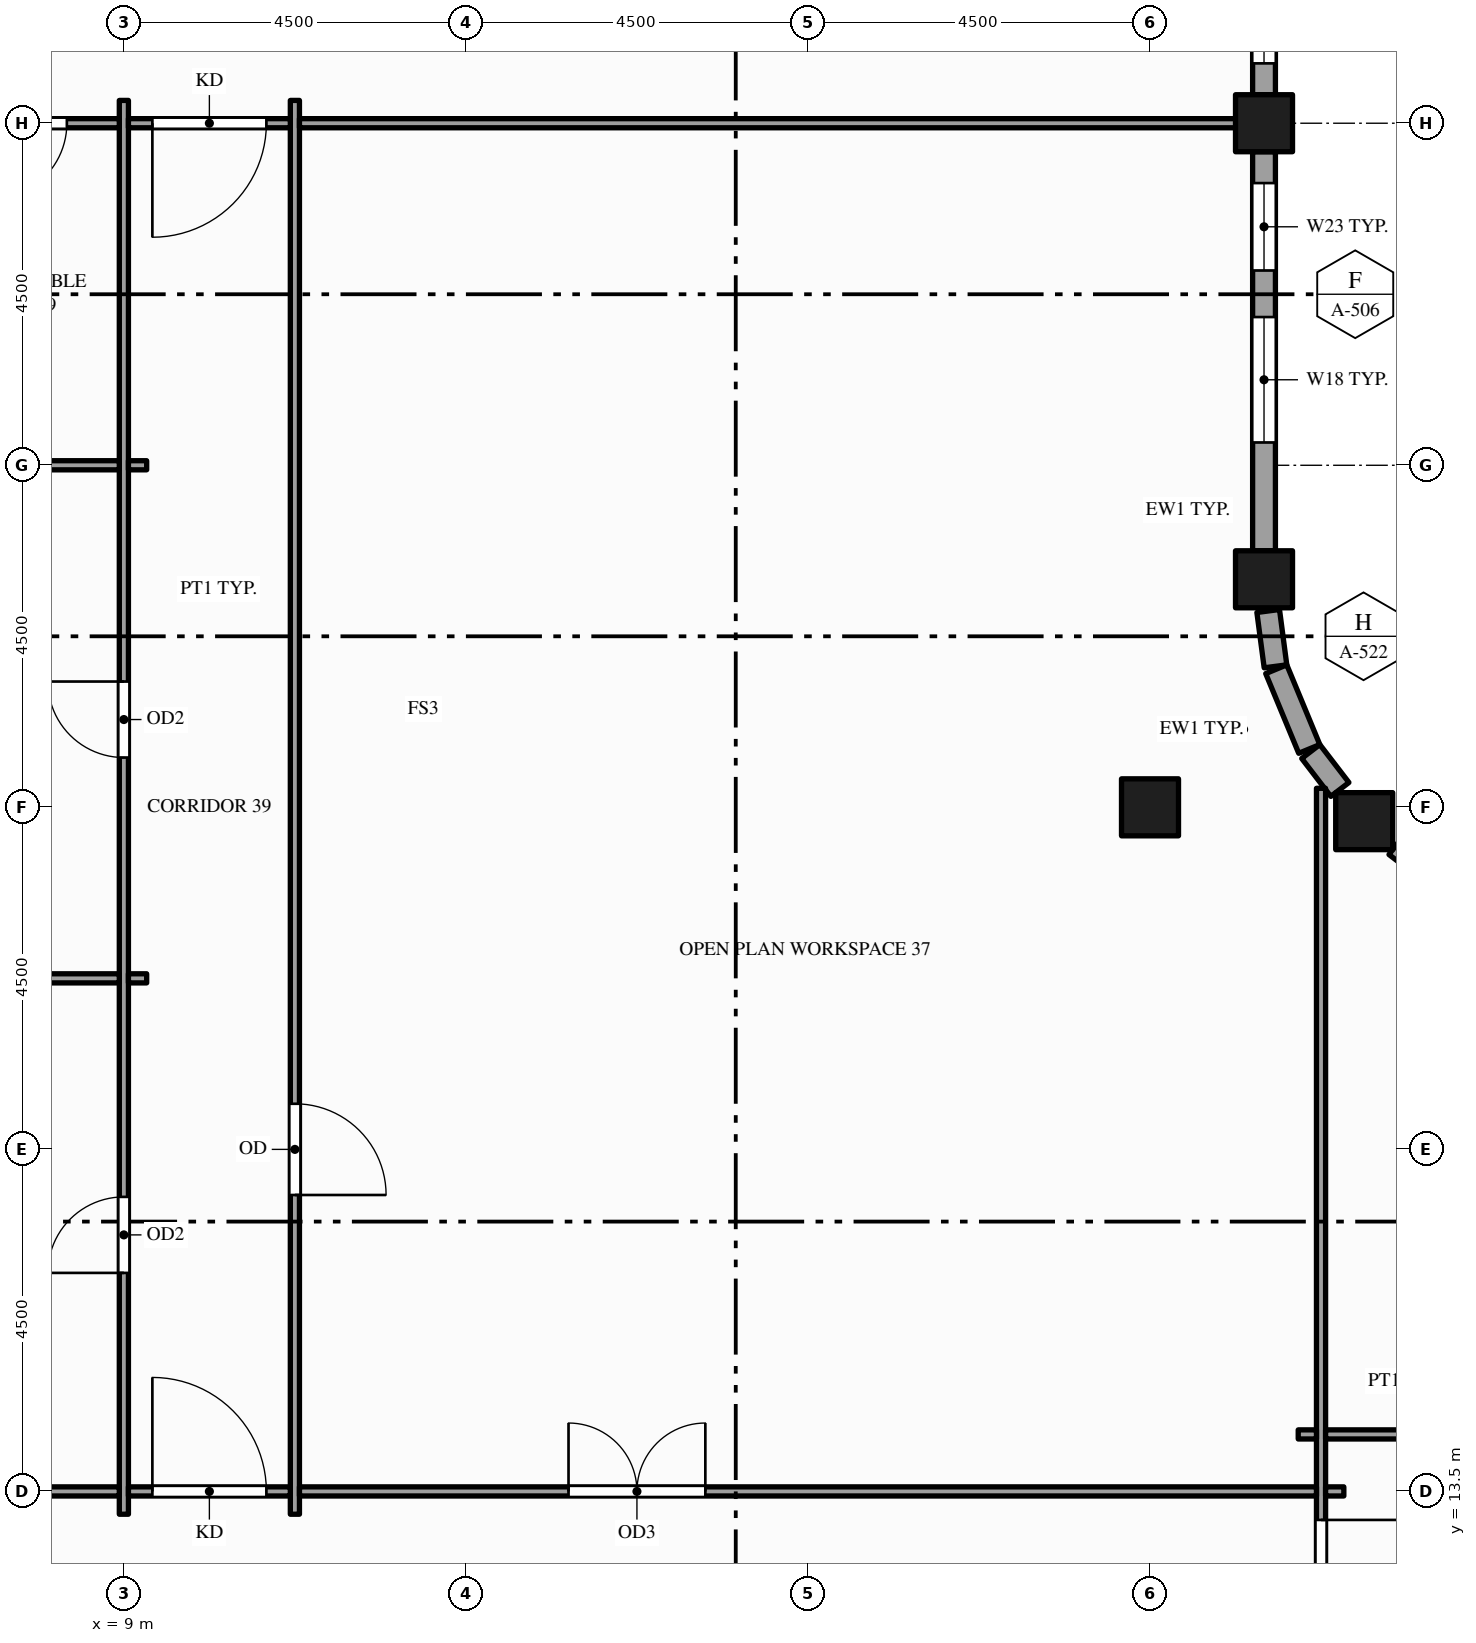
"""IFC4 building model, lengths in metres.
Left out: names, types, materials, properties, quantities, classifications, styles, units other than length and angle.
Written with IfcOpenShell. Run it as: python <this file> out.ifc"""

import sys

from ifc_helpers import new_model, si_unit, direction, frame, frame_2d, origin, origin_2d, place, context, subcontext, project, spatial, rectangle, hollow_rectangle, extrude, element, fill, save


model = new_model("IFC4")
c1 = context("Model", 3, precision=1e-05, world=origin(), true_north=direction((0.0, 1.0)))
c2 = subcontext(c1, "Body", "Model", "MODEL_VIEW")
j1 = project(units=[si_unit("LENGTHUNIT", "METRE"), si_unit("PLANEANGLEUNIT", "RADIAN")], contexts=[c1])
p1 = place(None, origin())
s1 = spatial("IfcSite", under=j1, at=p1, CompositionType="ELEMENT")
p2 = place(p1, origin())
s2 = spatial("IfcBuilding", under=s1, at=p2, CompositionType="ELEMENT")
p3 = place(p2, frame((0.0, 0.0, 239.0)))
s3 = spatial("IfcBuildingStorey", under=s2, at=p3, CompositionType="ELEMENT", Elevation=239.0)
for number, where, z_axis, x_axis in (
    (1, (22.5, 22.5, -0.15), (0.0, 0.0, 1.0), (1.0, 0.0, 0.0)),
    (2, (24.0, 25.5, -0.15), (0.0, 0.0, 1.0), (1.0, 0.0, 0.0)),
    (3, (24.0, 31.5, -0.15), (0.0, 0.0, 1.0), (1.0, 0.0, 0.0)),
    (4, (25.318, 22.318, -0.15), (0.0, 0.0, 1.0), (1.0, 0.0, 0.0)),
):
    element("IfcColumn", number, at=place(p3, frame(where, z_axis=z_axis, x_axis=x_axis)), inside=s3, PredefinedType="COLUMN", context=c2, shape_type="SweptSolid", body=[
        extrude(hollow_rectangle(XDim=0.75, YDim=0.75, WallThickness=0.036, at=origin_2d()), origin(), (0.0, 0.0, 1.0), 3.85),
    ])
for number, where, z_axis, x_axis in (
    (5, (26.234, 21.615, 0.0), (0.0, 0.0, 1.0), (-0.794, 0.608, 0.0)),
    (6, (24.998, 22.735, 0.0), (0.0, 0.0, 1.0), (-0.608, 0.794, 0.0)),
):
    element("IfcWall", number, at=place(p3, frame(where, z_axis=z_axis, x_axis=x_axis)), inside=s3, PredefinedType="STANDARD", context=c2, shape_type="SweptSolid", body=[
        extrude(rectangle(XDim=0.629, YDim=0.3, at=frame_2d((0.314, 0.0))), origin(), (0.0, 0.0, 1.0), 3.057),
    ])
p4 = place(p3, frame((24.595, 23.268, 0.0), z_axis=(0.0, 0.0, 1.0), x_axis=(-0.382598720491, 0.923914616768, 0.0)))
e7 = element("IfcWall", 7, at=p4, inside=s3, PredefinedType="STANDARD", context=c2, shape_type="SweptSolid", body=[
    extrude(rectangle(XDim=1.135, YDim=0.3, at=frame_2d((0.568, 0.0))), origin(), (0.0, 0.0, 1.0), 3.057),
])
p5 = place(p3, frame((24.151, 24.355, 0.0), z_axis=(0.0, 0.0, 1.0), x_axis=(-0.130660917588, 0.99142711513, 0.0)))
e8 = element("IfcWall", 8, at=p5, inside=s3, PredefinedType="STANDARD", context=c2, shape_type="SweptSolid", body=[
    extrude(rectangle(XDim=0.734, YDim=0.3, at=frame_2d((0.367, 0.0))), origin(), (0.0, 0.0, 1.0), 3.057),
])
p6 = place(p3, frame((24.0, 25.875, 0.0), z_axis=(0.0, 0.0, 1.0), x_axis=(0.0, 1.0, 0.0)))
e9 = element("IfcWall", 9, at=p6, inside=s3, PredefinedType="STANDARD", context=c2, shape_type="SweptSolid", body=[
    extrude(rectangle(XDim=5.25, YDim=0.3, at=frame_2d((2.625, 0.0))), origin(), (0.0, 0.0, 1.0), 3.007),
])
p7 = place(p6, frame((1.425, 0.0, 0.9)))
e10 = element("IfcOpeningElement", 10, at=p7, cuts=e9, PredefinedType="OPENING", context=c2, shape_type="SweptSolid", body=[
    extrude(rectangle(XDim=1.65, YDim=1.75, at=frame_2d((0.825, 0.875))), frame((0.0, 0.16, 0.0), z_axis=(0.0, -1.0, 0.0), x_axis=(1.0, 0.0, 0.0)), (0.0, 0.0, 1.0), 0.32),
])
p8 = place(p6, frame((3.688, 0.0, 0.9)))
e11 = element("IfcOpeningElement", 11, at=p8, cuts=e9, PredefinedType="OPENING", context=c2, shape_type="SweptSolid", body=[
    extrude(rectangle(XDim=1.15, YDim=1.75, at=frame_2d((0.575, 0.875))), frame((0.0, 0.16, 0.0), z_axis=(0.0, -1.0, 0.0), x_axis=(1.0, 0.0, 0.0)), (0.0, 0.0, 1.0), 0.32),
])
p9 = place(p3, frame((24.0, 31.875, 0.0), z_axis=(0.0, 0.0, 1.0), x_axis=(0.0, 1.0, 0.0)))
e12 = element("IfcWall", 12, at=p9, inside=s3, PredefinedType="STANDARD", context=c2, shape_type="SweptSolid", body=[
    extrude(rectangle(XDim=3.75, YDim=0.3, at=frame_2d((1.875, 0.0))), origin(), (0.0, 0.0, 1.0), 3.007),
])
p10 = place(p9, frame((0.413, 0.0, 0.9)))
e13 = element("IfcOpeningElement", 13, at=p10, cuts=e12, PredefinedType="OPENING", context=c2, shape_type="SweptSolid", body=[
    extrude(rectangle(XDim=1.15, YDim=1.75, at=frame_2d((0.575, 0.875))), frame((0.0, 0.16, 0.0), z_axis=(0.0, -1.0, 0.0), x_axis=(1.0, 0.0, 0.0)), (0.0, 0.0, 1.0), 0.32),
])
p11 = place(p9, frame((2.188, 0.0, 0.9)))
e14 = element("IfcOpeningElement", 14, at=p11, cuts=e12, PredefinedType="OPENING", context=c2, shape_type="SweptSolid", body=[
    extrude(rectangle(XDim=1.15, YDim=1.75, at=frame_2d((0.575, 0.875))), frame((0.0, 0.16, 0.0), z_axis=(0.0, -1.0, 0.0), x_axis=(1.0, 0.0, 0.0)), (0.0, 0.0, 1.0), 0.32),
])
p12 = place(p3, frame((9.0, 13.2, 0.0), z_axis=(0.0, 0.0, 1.0), x_axis=(0.0, 1.0, 0.0)))
e15 = element("IfcWall", 15, at=p12, inside=s3, PredefinedType="PARTITIONING", context=c2, shape_type="SweptSolid", body=[
    extrude(rectangle(XDim=18.6, YDim=0.12, at=frame_2d((9.3, 0.0))), origin(), (0.0, 0.0, 1.0), 2.72),
])
p13 = place(p12, frame((3.175, 0.0, 0.0)))
e16 = element("IfcOpeningElement", 16, at=p13, cuts=e15, PredefinedType="OPENING", context=c2, shape_type="SweptSolid", body=[
    extrude(rectangle(XDim=1.0, YDim=2.1, at=frame_2d((0.5, 1.05))), frame((0.0, 0.07, 0.0), z_axis=(0.0, -1.0, 0.0), x_axis=(1.0, 0.0, 0.0)), (0.0, 0.0, 1.0), 0.14),
])
p14 = place(p12, frame((9.955, 0.0, 0.0)))
e17 = element("IfcOpeningElement", 17, at=p14, cuts=e15, PredefinedType="OPENING", context=c2, shape_type="SweptSolid", body=[
    extrude(rectangle(XDim=1.0, YDim=2.1, at=frame_2d((0.5, 1.05))), frame((0.0, 0.07, 0.0), z_axis=(0.0, -1.0, 0.0), x_axis=(1.0, 0.0, 0.0)), (0.0, 0.0, 1.0), 0.14),
])
p15 = place(p3, frame((11.25, 13.2, 0.0), z_axis=(0.0, 0.0, 1.0), x_axis=(0.0, 1.0, 0.0)))
e18 = element("IfcWall", 18, at=p15, inside=s3, PredefinedType="PARTITIONING", context=c2, shape_type="SweptSolid", body=[
    extrude(rectangle(XDim=18.6, YDim=0.12, at=frame_2d((9.3, 0.0))), origin(), (0.0, 0.0, 1.0), 2.72),
])
p16 = place(p15, frame((4.2, 0.0, 0.0)))
e19 = element("IfcOpeningElement", 19, at=p16, cuts=e18, PredefinedType="OPENING", context=c2, shape_type="SweptSolid", body=[
    extrude(rectangle(XDim=1.2, YDim=2.1, at=frame_2d((0.6, 1.05))), frame((0.0, 0.07, 0.0), z_axis=(0.0, -1.0, 0.0), x_axis=(1.0, 0.0, 0.0)), (0.0, 0.0, 1.0), 0.14),
])
p17 = place(p3, frame((24.75, -1.35, 0.0), z_axis=(0.0, 0.0, 1.0), x_axis=(0.0, 1.0, 0.0)))
e20 = element("IfcWall", 20, at=p17, inside=s3, PredefinedType="PARTITIONING", context=c2, shape_type="SweptSolid", body=[
    extrude(rectangle(XDim=24.101, YDim=0.12, at=frame_2d((12.05, 0.0))), origin(), (0.0, 0.0, 1.0), 2.72),
])
p18 = place(p17, frame((12.975, 0.0, 0.0)))
e21 = element("IfcOpeningElement", 21, at=p18, cuts=e20, PredefinedType="OPENING", context=c2, shape_type="SweptSolid", body=[
    extrude(rectangle(XDim=1.5, YDim=2.1, at=frame_2d((0.75, 1.05))), frame((0.0, 0.07, 0.0), z_axis=(0.0, -1.0, 0.0), x_axis=(1.0, 0.0, 0.0)), (0.0, 0.0, 1.0), 0.14),
])
p19 = place(p3, frame((0.15, 13.5, 0.0), z_axis=(0.0, 0.0, 1.0), x_axis=(1.0, 0.0, 0.0)))
e22 = element("IfcWall", 22, at=p19, inside=s3, PredefinedType="PARTITIONING", context=c2, shape_type="SweptSolid", body=[
    extrude(rectangle(XDim=8.79, YDim=0.12, at=frame_2d((4.395, 0.0))), origin(), (0.0, 0.0, 1.0), 2.77),
])
p20 = place(p3, frame((9.06, 13.5, 0.0), z_axis=(0.0, 0.0, 1.0), x_axis=(1.0, 0.0, 0.0)))
e23 = element("IfcWall", 23, at=p20, inside=s3, PredefinedType="PARTITIONING", context=c2, shape_type="SweptSolid", body=[
    extrude(rectangle(XDim=2.13, YDim=0.12, at=frame_2d((1.065, 0.0))), origin(), (0.0, 0.0, 1.0), 2.77),
])
p21 = place(p20, frame((0.315, 0.0, 0.0)))
e24 = element("IfcOpeningElement", 24, at=p21, cuts=e23, PredefinedType="OPENING", context=c2, shape_type="SweptSolid", body=[
    extrude(rectangle(XDim=1.5, YDim=2.1, at=frame_2d((0.75, 1.05))), frame((0.0, 0.07, 0.0), z_axis=(0.0, -1.0, 0.0), x_axis=(1.0, 0.0, 0.0)), (0.0, 0.0, 1.0), 0.14),
])
p22 = place(p3, frame((11.31, 13.5, 0.0), z_axis=(0.0, 0.0, 1.0), x_axis=(1.0, 0.0, 0.0)))
e25 = element("IfcWall", 25, at=p22, inside=s3, PredefinedType="PARTITIONING", context=c2, shape_type="SweptSolid", body=[
    extrude(rectangle(XDim=13.38, YDim=0.12, at=frame_2d((6.69, 0.0))), origin(), (0.0, 0.0, 1.0), 2.77),
])
p23 = place(p22, frame((3.54, 0.0, 0.0)))
e26 = element("IfcOpeningElement", 26, at=p23, cuts=e25, PredefinedType="OPENING", context=c2, shape_type="SweptSolid", body=[
    extrude(rectangle(XDim=1.8, YDim=2.1, at=frame_2d((0.9, 1.05))), frame((0.0, 0.07, 0.0), z_axis=(0.0, -1.0, 0.0), x_axis=(1.0, 0.0, 0.0)), (0.0, 0.0, 1.0), 0.14),
])
for number, where, z_axis, x_axis in (
    (27, (24.81, 13.5, 0.0), (0.0, 0.0, 1.0), (1.0, 0.0, 0.0)),
    (28, (24.45, 14.25, 0.0), (0.0, 0.0, 1.0), (1.0, 0.0, 0.0)),
):
    element("IfcWall", number, at=place(p3, frame(where, z_axis=z_axis, x_axis=x_axis)), inside=s3, PredefinedType="PARTITIONING", context=c2, shape_type="SweptSolid", body=[
        extrude(rectangle(XDim=0.24, YDim=0.12, at=frame_2d((0.12, 0.0))), origin(), (0.0, 0.0, 1.0), 2.77),
    ])
p24 = place(p3, frame((24.81, 14.25, 0.0), z_axis=(0.0, 0.0, 1.0), x_axis=(1.0, 0.0, 0.0)))
e29 = element("IfcWall", 29, at=p24, inside=s3, PredefinedType="PARTITIONING", context=c2, shape_type="SweptSolid", body=[
    extrude(rectangle(XDim=2.13, YDim=0.12, at=frame_2d((1.065, 0.0))), origin(), (0.0, 0.0, 1.0), 2.77),
])
p25 = place(p3, frame((0.15, 20.25, 0.0), z_axis=(0.0, 0.0, 1.0), x_axis=(1.0, 0.0, 0.0)))
e30 = element("IfcWall", 30, at=p25, inside=s3, PredefinedType="PARTITIONING", context=c2, shape_type="SweptSolid", body=[
    extrude(rectangle(XDim=8.79, YDim=0.12, at=frame_2d((4.395, 0.0))), origin(), (0.0, 0.0, 1.0), 2.77),
])
p26 = place(p3, frame((9.06, 20.25, 0.0), z_axis=(0.0, 0.0, 1.0), x_axis=(1.0, 0.0, 0.0)))
e31 = element("IfcWall", 31, at=p26, inside=s3, PredefinedType="PARTITIONING", context=c2, shape_type="SweptSolid", body=[
    extrude(rectangle(XDim=0.24, YDim=0.12, at=frame_2d((0.12, 0.0))), origin(), (0.0, 0.0, 1.0), 2.77),
])
p27 = place(p3, frame((6.56, 27.0, 0.0), z_axis=(0.0, 0.0, 1.0), x_axis=(1.0, 0.0, 0.0)))
e32 = element("IfcWall", 32, at=p27, inside=s3, PredefinedType="PARTITIONING", context=c2, shape_type="SweptSolid", body=[
    extrude(rectangle(XDim=2.38, YDim=0.12, at=frame_2d((1.19, 0.0))), origin(), (0.0, 0.0, 1.0), 2.72),
])
p28 = place(p3, frame((9.06, 27.0, 0.0), z_axis=(0.0, 0.0, 1.0), x_axis=(1.0, 0.0, 0.0)))
e33 = element("IfcWall", 33, at=p28, inside=s3, PredefinedType="PARTITIONING", context=c2, shape_type="SweptSolid", body=[
    extrude(rectangle(XDim=0.24, YDim=0.12, at=frame_2d((0.12, 0.0))), origin(), (0.0, 0.0, 1.0), 2.72),
])
p29 = place(p3, frame((6.56, 31.5, 0.0), z_axis=(0.0, 0.0, 1.0), x_axis=(1.0, 0.0, 0.0)))
e34 = element("IfcWall", 34, at=p29, inside=s3, PredefinedType="PARTITIONING", context=c2, shape_type="SweptSolid", body=[
    extrude(rectangle(XDim=2.38, YDim=0.12, at=frame_2d((1.19, 0.0))), origin(), (0.0, 0.0, 1.0), 2.72),
])
p30 = place(p29, frame((0.69, 0.0, 0.0)))
e35 = element("IfcOpeningElement", 35, at=p30, cuts=e34, PredefinedType="OPENING", context=c2, shape_type="SweptSolid", body=[
    extrude(rectangle(XDim=1.0, YDim=2.1, at=frame_2d((0.5, 1.05))), frame((0.0, 0.07, 0.0), z_axis=(0.0, -1.0, 0.0), x_axis=(1.0, 0.0, 0.0)), (0.0, 0.0, 1.0), 0.14),
])
p31 = place(p3, frame((9.06, 31.5, 0.0), z_axis=(0.0, 0.0, 1.0), x_axis=(1.0, 0.0, 0.0)))
e36 = element("IfcWall", 36, at=p31, inside=s3, PredefinedType="PARTITIONING", context=c2, shape_type="SweptSolid", body=[
    extrude(rectangle(XDim=2.13, YDim=0.12, at=frame_2d((1.065, 0.0))), origin(), (0.0, 0.0, 1.0), 2.72),
])
p32 = place(p31, frame((0.315, 0.0, 0.0)))
e37 = element("IfcOpeningElement", 37, at=p32, cuts=e36, PredefinedType="OPENING", context=c2, shape_type="SweptSolid", body=[
    extrude(rectangle(XDim=1.5, YDim=2.1, at=frame_2d((0.75, 1.05))), frame((0.0, 0.07, 0.0), z_axis=(0.0, -1.0, 0.0), x_axis=(1.0, 0.0, 0.0)), (0.0, 0.0, 1.0), 0.14),
])
p33 = place(p3, frame((11.31, 31.5, 0.0), z_axis=(0.0, 0.0, 1.0), x_axis=(1.0, 0.0, 0.0)))
e38 = element("IfcWall", 38, at=p33, inside=s3, PredefinedType="PARTITIONING", context=c2, shape_type="SweptSolid", body=[
    extrude(rectangle(XDim=12.54, YDim=0.12, at=frame_2d((6.27, 0.0))), origin(), (0.0, 0.0, 1.0), 2.72),
])
p34 = place(p7, origin())
e39 = element("IfcWindow", 39, at=p34, inside=s3, PartitioningType="SINGLE_PANEL", PredefinedType="WINDOW", context=c2, shape_type="SweptSolid", body=[
    extrude(rectangle(XDim=1.65, YDim=1.75, at=frame_2d((0.825, 0.875))), frame((0.0, 0.03, 0.0), z_axis=(0.0, -1.0, 0.0), x_axis=(1.0, 0.0, 0.0)), (0.0, 0.0, 1.0), 0.06),
])
fill(e10, e39)
p35 = place(p8, origin())
e40 = element("IfcWindow", 40, at=p35, inside=s3, PartitioningType="SINGLE_PANEL", PredefinedType="WINDOW", context=c2, shape_type="SweptSolid", body=[
    extrude(rectangle(XDim=1.15, YDim=1.75, at=frame_2d((0.575, 0.875))), frame((0.0, 0.03, 0.0), z_axis=(0.0, -1.0, 0.0), x_axis=(1.0, 0.0, 0.0)), (0.0, 0.0, 1.0), 0.06),
])
fill(e11, e40)
p36 = place(p10, origin())
e41 = element("IfcWindow", 41, at=p36, inside=s3, PartitioningType="SINGLE_PANEL", PredefinedType="WINDOW", context=c2, shape_type="SweptSolid", body=[
    extrude(rectangle(XDim=1.15, YDim=1.75, at=frame_2d((0.575, 0.875))), frame((0.0, 0.03, 0.0), z_axis=(0.0, -1.0, 0.0), x_axis=(1.0, 0.0, 0.0)), (0.0, 0.0, 1.0), 0.06),
])
fill(e13, e41)
p37 = place(p18, origin())
e42 = element("IfcDoor", 42, at=p37, inside=s3, OperationType="SINGLE_SWING_RIGHT", PredefinedType="DOOR", context=c2, shape_type="SweptSolid", body=[
    extrude(rectangle(XDim=1.5, YDim=2.1, at=frame_2d((0.75, 1.05))), frame((0.0, 0.025, 0.0), z_axis=(0.0, -1.0, 0.0), x_axis=(1.0, 0.0, 0.0)), (0.0, 0.0, 1.0), 0.05),
])
fill(e21, e42)
p38 = place(p23, origin())
e43 = element("IfcDoor", 43, at=p38, inside=s3, OperationType="DOUBLE_DOOR_SINGLE_SWING", PredefinedType="DOOR", context=c2, shape_type="SweptSolid", body=[
    extrude(rectangle(XDim=1.8, YDim=2.1, at=frame_2d((0.9, 1.05))), frame((0.0, 0.025, 0.0), z_axis=(0.0, -1.0, 0.0), x_axis=(1.0, 0.0, 0.0)), (0.0, 0.0, 1.0), 0.05),
])
fill(e26, e43)
p39 = place(p21, origin())
e44 = element("IfcDoor", 44, at=p39, inside=s3, OperationType="SINGLE_SWING_LEFT", PredefinedType="DOOR", context=c2, shape_type="SweptSolid", body=[
    extrude(rectangle(XDim=1.5, YDim=2.1, at=frame_2d((0.75, 1.05))), frame((0.0, 0.025, 0.0), z_axis=(0.0, -1.0, 0.0), x_axis=(1.0, 0.0, 0.0)), (0.0, 0.0, 1.0), 0.05),
])
fill(e24, e44)
p40 = place(p32, origin())
e45 = element("IfcDoor", 45, at=p40, inside=s3, OperationType="SINGLE_SWING_LEFT", PredefinedType="DOOR", context=c2, shape_type="SweptSolid", body=[
    extrude(rectangle(XDim=1.5, YDim=2.1, at=frame_2d((0.75, 1.05))), frame((0.0, 0.025, 0.0), z_axis=(0.0, -1.0, 0.0), x_axis=(1.0, 0.0, 0.0)), (0.0, 0.0, 1.0), 0.05),
])
fill(e37, e45)
p41 = place(p13, origin())
e46 = element("IfcDoor", 46, at=p41, inside=s3, OperationType="SINGLE_SWING_LEFT", PredefinedType="DOOR", context=c2, shape_type="SweptSolid", body=[
    extrude(rectangle(XDim=1.0, YDim=2.1, at=frame_2d((0.5, 1.05))), frame((0.0, 0.025, 0.0), z_axis=(0.0, -1.0, 0.0), x_axis=(1.0, 0.0, 0.0)), (0.0, 0.0, 1.0), 0.05),
])
fill(e16, e46)
p42 = place(p14, origin())
e47 = element("IfcDoor", 47, at=p42, inside=s3, OperationType="SINGLE_SWING_RIGHT", PredefinedType="DOOR", context=c2, shape_type="SweptSolid", body=[
    extrude(rectangle(XDim=1.0, YDim=2.1, at=frame_2d((0.5, 1.05))), frame((0.0, 0.025, 0.0), z_axis=(0.0, -1.0, 0.0), x_axis=(1.0, 0.0, 0.0)), (0.0, 0.0, 1.0), 0.05),
])
fill(e17, e47)
p43 = place(p30, origin())
e48 = element("IfcDoor", 48, at=p43, inside=s3, OperationType="SINGLE_SWING_LEFT", PredefinedType="DOOR", context=c2, shape_type="SweptSolid", body=[
    extrude(rectangle(XDim=1.0, YDim=2.1, at=frame_2d((0.5, 1.05))), frame((0.0, 0.025, 0.0), z_axis=(0.0, -1.0, 0.0), x_axis=(1.0, 0.0, 0.0)), (0.0, 0.0, 1.0), 0.05),
])
fill(e35, e48)
p44 = place(p16, origin())
e49 = element("IfcDoor", 49, at=p44, inside=s3, OperationType="SINGLE_SWING_LEFT", PredefinedType="DOOR", context=c2, shape_type="SweptSolid", body=[
    extrude(rectangle(XDim=1.2, YDim=2.1, at=frame_2d((0.6, 1.05))), frame((0.0, 0.025, 0.0), z_axis=(0.0, -1.0, 0.0), x_axis=(1.0, 0.0, 0.0)), (0.0, 0.0, 1.0), 0.05),
])
fill(e19, e49)
save(model, sys.argv[1])
